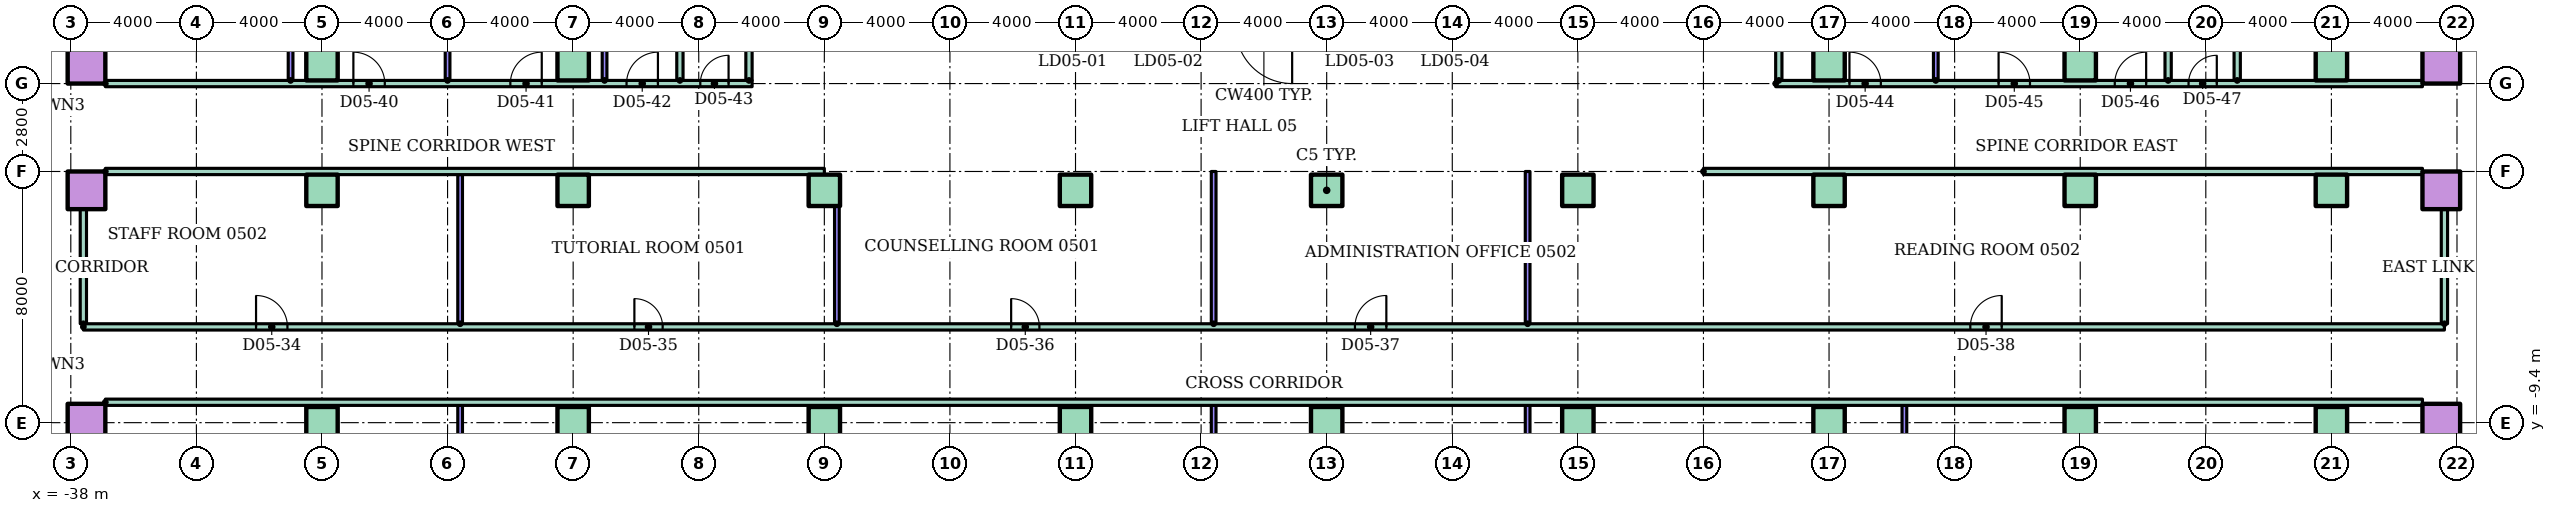
"""IFC4 building model, lengths in metres.
Left out: names, types, materials, properties, quantities, classifications, styles, units other than length and angle.
Written with IfcOpenShell. Run it as: python <this file> out.ifc"""

import sys

from ifc_helpers import new_model, si_unit, direction, frame, frame_2d, origin, origin_2d, place, context, subcontext, project, spatial, rectangle, hollow_rectangle, extrude, element, fill, save


model = new_model("IFC4")
c1 = context("Model", 3, precision=1e-05, world=origin(), true_north=direction((0.0, 1.0)))
c2 = subcontext(c1, "Body", "Model", "MODEL_VIEW")
j1 = project(units=[si_unit("LENGTHUNIT", "METRE"), si_unit("PLANEANGLEUNIT", "RADIAN")], contexts=[c1])
p1 = place(None, origin())
s1 = spatial("IfcSite", under=j1, at=p1, CompositionType="ELEMENT")
p2 = place(p1, origin())
s2 = spatial("IfcBuilding", under=s1, at=p2, CompositionType="ELEMENT")
p3 = place(p2, frame((0.0, 0.0, 22.0)))
s3 = spatial("IfcBuildingStorey", under=s2, at=p3, CompositionType="ELEMENT", Elevation=22.0)
p4 = place(p3, frame((-37.5, -9.4, 0.0)))
e1 = element("IfcColumn", 1, at=p4, inside=s3, PredefinedType="COLUMN", context=c2, shape_type="SweptSolid", body=[
    extrude(hollow_rectangle(XDim=1.2, YDim=1.2, WallThickness=0.06, at=origin_2d()), origin(), (0.0, 0.0, 1.0), 4.0),
])
for number, where in (
    (2, (-30.0, -9.4, 0.0)),
    (3, (-22.0, -9.4, 0.0)),
    (4, (-14.0, -9.4, 0.0)),
    (5, (-6.0, -9.4, 0.0)),
    (6, (2.0, -9.4, 0.0)),
    (7, (10.0, -9.4, 0.0)),
    (8, (18.0, -9.4, 0.0)),
    (9, (26.0, -9.4, 0.0)),
    (10, (34.0, -9.4, 0.0)),
):
    element("IfcColumn", number, at=place(p3, frame(where)), inside=s3, PredefinedType="COLUMN", context=c2, shape_type="SweptSolid", body=[
        extrude(rectangle(XDim=1.0, YDim=1.0, at=origin_2d()), origin(), (0.0, 0.0, 1.0), 4.0),
    ])
for number, where in (
    (11, (37.5, -9.4, 0.0)),
    (12, (-37.5, -2.0, 0.0)),
):
    element("IfcColumn", number, at=place(p3, frame(where)), inside=s3, PredefinedType="COLUMN", context=c2, shape_type="SweptSolid", body=[
        extrude(hollow_rectangle(XDim=1.2, YDim=1.2, WallThickness=0.06, at=origin_2d()), origin(), (0.0, 0.0, 1.0), 4.0),
    ])
for number, where in (
    (13, (-30.0, -2.0, 0.0)),
    (14, (-22.0, -2.0, 0.0)),
    (15, (-14.0, -2.0, 0.0)),
    (16, (-6.0, -2.0, 0.0)),
    (17, (2.0, -2.0, 0.0)),
    (18, (10.0, -2.0, 0.0)),
    (19, (18.0, -2.0, 0.0)),
    (20, (26.0, -2.0, 0.0)),
    (21, (34.0, -2.0, 0.0)),
):
    element("IfcColumn", number, at=place(p3, frame(where)), inside=s3, PredefinedType="COLUMN", context=c2, shape_type="SweptSolid", body=[
        extrude(rectangle(XDim=1.0, YDim=1.0, at=origin_2d()), origin(), (0.0, 0.0, 1.0), 4.0),
    ])
for number, where in (
    (22, (37.5, -2.0, 0.0)),
    (23, (-37.5, 2.0, 0.0)),
):
    element("IfcColumn", number, at=place(p3, frame(where)), inside=s3, PredefinedType="COLUMN", context=c2, shape_type="SweptSolid", body=[
        extrude(hollow_rectangle(XDim=1.2, YDim=1.2, WallThickness=0.06, at=origin_2d()), origin(), (0.0, 0.0, 1.0), 4.0),
    ])
for number, where in (
    (24, (-30.0, 2.0, 0.0)),
    (25, (-22.0, 2.0, 0.0)),
    (26, (18.0, 2.0, 0.0)),
    (27, (26.0, 2.0, 0.0)),
    (28, (34.0, 2.0, 0.0)),
):
    element("IfcColumn", number, at=place(p3, frame(where)), inside=s3, PredefinedType="COLUMN", context=c2, shape_type="SweptSolid", body=[
        extrude(rectangle(XDim=1.0, YDim=1.0, at=origin_2d()), origin(), (0.0, 0.0, 1.0), 4.0),
    ])
p5 = place(p3, frame((37.5, 2.0, 0.0)))
e29 = element("IfcColumn", 29, at=p5, inside=s3, PredefinedType="COLUMN", context=c2, shape_type="SweptSolid", body=[
    extrude(hollow_rectangle(XDim=1.2, YDim=1.2, WallThickness=0.06, at=origin_2d()), origin(), (0.0, 0.0, 1.0), 4.0),
])
p6 = place(p3, frame((-36.9, -8.75, 0.0)))
e30 = element("IfcWall", 30, at=p6, inside=s3, PredefinedType="PARTITIONING", context=c2, shape_type="SweptSolid", body=[
    extrude(rectangle(XDim=73.8, YDim=0.2, at=frame_2d((36.9, 0.0))), origin(), (0.0, 0.0, 1.0), 3.2),
])
p7 = place(p3, frame((-37.6, -6.35, 0.0)))
e31 = element("IfcWall", 31, at=p7, inside=s3, PredefinedType="PARTITIONING", context=c2, shape_type="SweptSolid", body=[
    extrude(rectangle(XDim=75.2, YDim=0.2, at=frame_2d((37.6, 0.0))), origin(), (0.0, 0.0, 1.0), 3.2),
])
p8 = place(p7, frame((5.5, 0.0, 0.0)))
e32 = element("IfcOpeningElement", 32, at=p8, cuts=e31, PredefinedType="OPENING", context=c2, shape_type="SweptSolid", body=[
    extrude(rectangle(XDim=1.0, YDim=2.1, at=frame_2d((0.5, 1.05))), frame((0.0, 0.11, 0.0), z_axis=(0.0, -1.0, 0.0), x_axis=(1.0, 0.0, 0.0)), (0.0, 0.0, 1.0), 0.22),
])
p9 = place(p7, frame((17.55, 0.0, 0.0)))
e33 = element("IfcOpeningElement", 33, at=p9, cuts=e31, PredefinedType="OPENING", context=c2, shape_type="SweptSolid", body=[
    extrude(rectangle(XDim=0.9, YDim=2.1, at=frame_2d((0.45, 1.05))), frame((0.0, 0.11, 0.0), z_axis=(0.0, -1.0, 0.0), x_axis=(1.0, 0.0, 0.0)), (0.0, 0.0, 1.0), 0.22),
])
p10 = place(p7, frame((29.55, 0.0, 0.0)))
e34 = element("IfcOpeningElement", 34, at=p10, cuts=e31, PredefinedType="OPENING", context=c2, shape_type="SweptSolid", body=[
    extrude(rectangle(XDim=0.9, YDim=2.1, at=frame_2d((0.45, 1.05))), frame((0.0, 0.11, 0.0), z_axis=(0.0, -1.0, 0.0), x_axis=(1.0, 0.0, 0.0)), (0.0, 0.0, 1.0), 0.22),
])
p11 = place(p7, frame((40.5, 0.0, 0.0)))
e35 = element("IfcOpeningElement", 35, at=p11, cuts=e31, PredefinedType="OPENING", context=c2, shape_type="SweptSolid", body=[
    extrude(rectangle(XDim=1.0, YDim=2.1, at=frame_2d((0.5, 1.05))), frame((0.0, 0.11, 0.0), z_axis=(0.0, -1.0, 0.0), x_axis=(1.0, 0.0, 0.0)), (0.0, 0.0, 1.0), 0.22),
])
p12 = place(p7, frame((60.1, 0.0, 0.0)))
e36 = element("IfcOpeningElement", 36, at=p12, cuts=e31, PredefinedType="OPENING", context=c2, shape_type="SweptSolid", body=[
    extrude(rectangle(XDim=1.0, YDim=2.1, at=frame_2d((0.5, 1.05))), frame((0.0, 0.11, 0.0), z_axis=(0.0, -1.0, 0.0), x_axis=(1.0, 0.0, 0.0)), (0.0, 0.0, 1.0), 0.22),
])
for number, where in (
    (37, (-36.9, -1.4, 0.0)),
    (38, (14.0, -1.4, 0.0)),
):
    element("IfcWall", number, at=place(p3, frame(where)), inside=s3, PredefinedType="PARTITIONING", context=c2, shape_type="SweptSolid", body=[
        extrude(rectangle(XDim=22.9, YDim=0.2, at=frame_2d((11.45, 0.0))), origin(), (0.0, 0.0, 1.0), 3.2),
    ])
p13 = place(p3, frame((-36.9, 1.4, 0.0)))
e39 = element("IfcWall", 39, at=p13, inside=s3, PredefinedType="PARTITIONING", context=c2, shape_type="SweptSolid", body=[
    extrude(rectangle(XDim=20.6, YDim=0.2, at=frame_2d((10.3, 0.0))), origin(), (0.0, 0.0, 1.0), 3.2),
])
p14 = place(p13, frame((7.9, 0.0, 0.0)))
e40 = element("IfcOpeningElement", 40, at=p14, cuts=e39, PredefinedType="OPENING", context=c2, shape_type="SweptSolid", body=[
    extrude(rectangle(XDim=1.0, YDim=2.1, at=frame_2d((0.5, 1.05))), frame((0.0, 0.11, 0.0), z_axis=(0.0, -1.0, 0.0), x_axis=(1.0, 0.0, 0.0)), (0.0, 0.0, 1.0), 0.22),
])
p15 = place(p13, frame((12.9, 0.0, 0.0)))
e41 = element("IfcOpeningElement", 41, at=p15, cuts=e39, PredefinedType="OPENING", context=c2, shape_type="SweptSolid", body=[
    extrude(rectangle(XDim=1.0, YDim=2.1, at=frame_2d((0.5, 1.05))), frame((0.0, 0.11, 0.0), z_axis=(0.0, -1.0, 0.0), x_axis=(1.0, 0.0, 0.0)), (0.0, 0.0, 1.0), 0.22),
])
p16 = place(p13, frame((16.6, 0.0, 0.0)))
e42 = element("IfcOpeningElement", 42, at=p16, cuts=e39, PredefinedType="OPENING", context=c2, shape_type="SweptSolid", body=[
    extrude(rectangle(XDim=1.0, YDim=2.1, at=frame_2d((0.5, 1.05))), frame((0.0, 0.11, 0.0), z_axis=(0.0, -1.0, 0.0), x_axis=(1.0, 0.0, 0.0)), (0.0, 0.0, 1.0), 0.22),
])
p17 = place(p13, frame((18.95, 0.0, 0.0)))
e43 = element("IfcOpeningElement", 43, at=p17, cuts=e39, PredefinedType="OPENING", context=c2, shape_type="SweptSolid", body=[
    extrude(rectangle(XDim=0.9, YDim=2.1, at=frame_2d((0.45, 1.05))), frame((0.0, 0.11, 0.0), z_axis=(0.0, -1.0, 0.0), x_axis=(1.0, 0.0, 0.0)), (0.0, 0.0, 1.0), 0.22),
])
p18 = place(p3, frame((16.3, 1.4, 0.0)))
e44 = element("IfcWall", 44, at=p18, inside=s3, PredefinedType="PARTITIONING", context=c2, shape_type="SweptSolid", body=[
    extrude(rectangle(XDim=20.6, YDim=0.2, at=frame_2d((10.3, 0.0))), origin(), (0.0, 0.0, 1.0), 3.2),
])
p19 = place(p18, frame((2.35, 0.0, 0.0)))
e45 = element("IfcOpeningElement", 45, at=p19, cuts=e44, PredefinedType="OPENING", context=c2, shape_type="SweptSolid", body=[
    extrude(rectangle(XDim=1.0, YDim=2.1, at=frame_2d((0.5, 1.05))), frame((0.0, 0.11, 0.0), z_axis=(0.0, -1.0, 0.0), x_axis=(1.0, 0.0, 0.0)), (0.0, 0.0, 1.0), 0.22),
])
p20 = place(p18, frame((7.1, 0.0, 0.0)))
e46 = element("IfcOpeningElement", 46, at=p20, cuts=e44, PredefinedType="OPENING", context=c2, shape_type="SweptSolid", body=[
    extrude(rectangle(XDim=1.0, YDim=2.1, at=frame_2d((0.5, 1.05))), frame((0.0, 0.11, 0.0), z_axis=(0.0, -1.0, 0.0), x_axis=(1.0, 0.0, 0.0)), (0.0, 0.0, 1.0), 0.22),
])
p21 = place(p18, frame((10.8, 0.0, 0.0)))
e47 = element("IfcOpeningElement", 47, at=p21, cuts=e44, PredefinedType="OPENING", context=c2, shape_type="SweptSolid", body=[
    extrude(rectangle(XDim=1.0, YDim=2.1, at=frame_2d((0.5, 1.05))), frame((0.0, 0.11, 0.0), z_axis=(0.0, -1.0, 0.0), x_axis=(1.0, 0.0, 0.0)), (0.0, 0.0, 1.0), 0.22),
])
p22 = place(p18, frame((13.15, 0.0, 0.0)))
e48 = element("IfcOpeningElement", 48, at=p22, cuts=e44, PredefinedType="OPENING", context=c2, shape_type="SweptSolid", body=[
    extrude(rectangle(XDim=0.9, YDim=2.1, at=frame_2d((0.45, 1.05))), frame((0.0, 0.11, 0.0), z_axis=(0.0, -1.0, 0.0), x_axis=(1.0, 0.0, 0.0)), (0.0, 0.0, 1.0), 0.22),
])
p23 = place(p3, frame((-37.6, -6.25, 0.0), z_axis=(0.0, 0.0, 1.0), x_axis=(0.0, 1.0, 0.0)))
e49 = element("IfcWall", 49, at=p23, inside=s3, PredefinedType="PARTITIONING", context=c2, shape_type="SweptSolid", body=[
    extrude(rectangle(XDim=3.65, YDim=0.2, at=frame_2d((1.825, 0.0))), origin(), (0.0, 0.0, 1.0), 3.2),
])
for number, where, z_axis, x_axis in (
    (50, (-31.0, 1.5, 0.0), (0.0, 0.0, 1.0), (0.0, 1.0, 0.0)),
    (51, (-26.0, 1.5, 0.0), (0.0, 0.0, 1.0), (0.0, 1.0, 0.0)),
):
    element("IfcWall", number, at=place(p3, frame(where, z_axis=z_axis, x_axis=x_axis)), inside=s3, PredefinedType="PARTITIONING", context=c2, shape_type="SweptSolid", body=[
        extrude(rectangle(XDim=7.0, YDim=0.15, at=frame_2d((3.5, 0.0))), origin(), (0.0, 0.0, 1.0), 3.2),
    ])
p24 = place(p3, frame((-25.6, -19.5, 0.0), z_axis=(0.0, 0.0, 1.0), x_axis=(0.0, 1.0, 0.0)))
e52 = element("IfcWall", 52, at=p24, inside=s3, PredefinedType="PARTITIONING", context=c2, shape_type="SweptSolid", body=[
    extrude(rectangle(XDim=10.65, YDim=0.15, at=frame_2d((5.325, 0.0))), origin(), (0.0, 0.0, 1.0), 3.2),
])
p25 = place(p3, frame((-25.6, -6.25, 0.0), z_axis=(0.0, 0.0, 1.0), x_axis=(0.0, 1.0, 0.0)))
e53 = element("IfcWall", 53, at=p25, inside=s3, PredefinedType="PARTITIONING", context=c2, shape_type="SweptSolid", body=[
    extrude(rectangle(XDim=4.75, YDim=0.15, at=frame_2d((2.375, 0.0))), origin(), (0.0, 0.0, 1.0), 3.2),
])
p26 = place(p3, frame((-21.0, 1.5, 0.0), z_axis=(0.0, 0.0, 1.0), x_axis=(0.0, 1.0, 0.0)))
e54 = element("IfcWall", 54, at=p26, inside=s3, PredefinedType="PARTITIONING", context=c2, shape_type="SweptSolid", body=[
    extrude(rectangle(XDim=7.0, YDim=0.15, at=frame_2d((3.5, 0.0))), origin(), (0.0, 0.0, 1.0), 3.2),
])
for number, where, z_axis, x_axis in (
    (55, (-18.6, 1.5, 0.0), (0.0, 0.0, 1.0), (0.0, 1.0, 0.0)),
    (56, (-16.4, 1.5, 0.0), (0.0, 0.0, 1.0), (0.0, 1.0, 0.0)),
):
    element("IfcWall", number, at=place(p3, frame(where, z_axis=z_axis, x_axis=x_axis)), inside=s3, PredefinedType="PARTITIONING", context=c2, shape_type="SweptSolid", body=[
        extrude(rectangle(XDim=7.0, YDim=0.2, at=frame_2d((3.5, 0.0))), origin(), (0.0, 0.0, 1.0), 3.2),
    ])
p27 = place(p3, frame((-13.6, -6.25, 0.0), z_axis=(0.0, 0.0, 1.0), x_axis=(0.0, 1.0, 0.0)))
e57 = element("IfcWall", 57, at=p27, inside=s3, PredefinedType="PARTITIONING", context=c2, shape_type="SweptSolid", body=[
    extrude(rectangle(XDim=3.75, YDim=0.15, at=frame_2d((1.875, 0.0))), origin(), (0.0, 0.0, 1.0), 3.2),
])
p28 = place(p3, frame((-1.6, -19.5, 0.0), z_axis=(0.0, 0.0, 1.0), x_axis=(0.0, 1.0, 0.0)))
e58 = element("IfcWall", 58, at=p28, inside=s3, PredefinedType="PARTITIONING", context=c2, shape_type="SweptSolid", body=[
    extrude(rectangle(XDim=10.65, YDim=0.15, at=frame_2d((5.325, 0.0))), origin(), (0.0, 0.0, 1.0), 3.2),
])
p29 = place(p3, frame((-1.6, -6.25, 0.0), z_axis=(0.0, 0.0, 1.0), x_axis=(0.0, 1.0, 0.0)))
e59 = element("IfcWall", 59, at=p29, inside=s3, PredefinedType="PARTITIONING", context=c2, shape_type="SweptSolid", body=[
    extrude(rectangle(XDim=4.85, YDim=0.15, at=frame_2d((2.425, 0.0))), origin(), (0.0, 0.0, 1.0), 3.2),
])
p30 = place(p3, frame((8.4, -19.5, 0.0), z_axis=(0.0, 0.0, 1.0), x_axis=(0.0, 1.0, 0.0)))
e60 = element("IfcWall", 60, at=p30, inside=s3, PredefinedType="PARTITIONING", context=c2, shape_type="SweptSolid", body=[
    extrude(rectangle(XDim=10.65, YDim=0.15, at=frame_2d((5.325, 0.0))), origin(), (0.0, 0.0, 1.0), 3.2),
])
p31 = place(p3, frame((8.4, -6.25, 0.0), z_axis=(0.0, 0.0, 1.0), x_axis=(0.0, 1.0, 0.0)))
e61 = element("IfcWall", 61, at=p31, inside=s3, PredefinedType="PARTITIONING", context=c2, shape_type="SweptSolid", body=[
    extrude(rectangle(XDim=4.85, YDim=0.15, at=frame_2d((2.425, 0.0))), origin(), (0.0, 0.0, 1.0), 3.2),
])
p32 = place(p3, frame((16.4, 1.5, 0.0), z_axis=(0.0, 0.0, 1.0), x_axis=(0.0, 1.0, 0.0)))
e62 = element("IfcWall", 62, at=p32, inside=s3, PredefinedType="PARTITIONING", context=c2, shape_type="SweptSolid", body=[
    extrude(rectangle(XDim=7.0, YDim=0.2, at=frame_2d((3.5, 0.0))), origin(), (0.0, 0.0, 1.0), 3.2),
])
p33 = place(p3, frame((20.4, -19.5, 0.0), z_axis=(0.0, 0.0, 1.0), x_axis=(0.0, 1.0, 0.0)))
e63 = element("IfcWall", 63, at=p33, inside=s3, PredefinedType="PARTITIONING", context=c2, shape_type="SweptSolid", body=[
    extrude(rectangle(XDim=10.65, YDim=0.15, at=frame_2d((5.325, 0.0))), origin(), (0.0, 0.0, 1.0), 3.2),
])
p34 = place(p3, frame((21.4, 1.5, 0.0), z_axis=(0.0, 0.0, 1.0), x_axis=(0.0, 1.0, 0.0)))
e64 = element("IfcWall", 64, at=p34, inside=s3, PredefinedType="PARTITIONING", context=c2, shape_type="SweptSolid", body=[
    extrude(rectangle(XDim=7.0, YDim=0.15, at=frame_2d((3.5, 0.0))), origin(), (0.0, 0.0, 1.0), 3.2),
])
for number, where, z_axis, x_axis in (
    (65, (28.8, 1.5, 0.0), (0.0, 0.0, 1.0), (0.0, 1.0, 0.0)),
    (66, (31.0, 1.5, 0.0), (0.0, 0.0, 1.0), (0.0, 1.0, 0.0)),
):
    element("IfcWall", number, at=place(p3, frame(where, z_axis=z_axis, x_axis=x_axis)), inside=s3, PredefinedType="PARTITIONING", context=c2, shape_type="SweptSolid", body=[
        extrude(rectangle(XDim=7.0, YDim=0.2, at=frame_2d((3.5, 0.0))), origin(), (0.0, 0.0, 1.0), 3.2),
    ])
p35 = place(p3, frame((37.6, -6.25, 0.0), z_axis=(0.0, 0.0, 1.0), x_axis=(0.0, 1.0, 0.0)))
e67 = element("IfcWall", 67, at=p35, inside=s3, PredefinedType="PARTITIONING", context=c2, shape_type="SweptSolid", body=[
    extrude(rectangle(XDim=3.65, YDim=0.2, at=frame_2d((1.825, 0.0))), origin(), (0.0, 0.0, 1.0), 3.2),
])
p36 = place(p8, origin())
e68 = element("IfcDoor", 68, at=p36, inside=s3, OperationType="SINGLE_SWING_LEFT", PredefinedType="DOOR", context=c2, shape_type="SweptSolid", body=[
    extrude(rectangle(XDim=1.0, YDim=2.1, at=frame_2d((0.5, 1.05))), frame((0.0, 0.025, 0.0), z_axis=(0.0, -1.0, 0.0), x_axis=(1.0, 0.0, 0.0)), (0.0, 0.0, 1.0), 0.05),
])
fill(e32, e68)
p37 = place(p9, origin())
e69 = element("IfcDoor", 69, at=p37, inside=s3, OperationType="SINGLE_SWING_LEFT", PredefinedType="DOOR", context=c2, shape_type="SweptSolid", body=[
    extrude(rectangle(XDim=0.9, YDim=2.1, at=frame_2d((0.45, 1.05))), frame((0.0, 0.025, 0.0), z_axis=(0.0, -1.0, 0.0), x_axis=(1.0, 0.0, 0.0)), (0.0, 0.0, 1.0), 0.05),
])
fill(e33, e69)
p38 = place(p10, origin())
e70 = element("IfcDoor", 70, at=p38, inside=s3, OperationType="SINGLE_SWING_LEFT", PredefinedType="DOOR", context=c2, shape_type="SweptSolid", body=[
    extrude(rectangle(XDim=0.9, YDim=2.1, at=frame_2d((0.45, 1.05))), frame((0.0, 0.025, 0.0), z_axis=(0.0, -1.0, 0.0), x_axis=(1.0, 0.0, 0.0)), (0.0, 0.0, 1.0), 0.05),
])
fill(e34, e70)
p39 = place(p11, origin())
e71 = element("IfcDoor", 71, at=p39, inside=s3, OperationType="SINGLE_SWING_RIGHT", PredefinedType="DOOR", context=c2, shape_type="SweptSolid", body=[
    extrude(rectangle(XDim=1.0, YDim=2.1, at=frame_2d((0.5, 1.05))), frame((0.0, 0.025, 0.0), z_axis=(0.0, -1.0, 0.0), x_axis=(1.0, 0.0, 0.0)), (0.0, 0.0, 1.0), 0.05),
])
fill(e35, e71)
p40 = place(p12, origin())
e72 = element("IfcDoor", 72, at=p40, inside=s3, OperationType="SINGLE_SWING_RIGHT", PredefinedType="DOOR", context=c2, shape_type="SweptSolid", body=[
    extrude(rectangle(XDim=1.0, YDim=2.1, at=frame_2d((0.5, 1.05))), frame((0.0, 0.025, 0.0), z_axis=(0.0, -1.0, 0.0), x_axis=(1.0, 0.0, 0.0)), (0.0, 0.0, 1.0), 0.05),
])
fill(e36, e72)
p41 = place(p14, origin())
e73 = element("IfcDoor", 73, at=p41, inside=s3, OperationType="SINGLE_SWING_LEFT", PredefinedType="DOOR", context=c2, shape_type="SweptSolid", body=[
    extrude(rectangle(XDim=1.0, YDim=2.1, at=frame_2d((0.5, 1.05))), frame((0.0, 0.025, 0.0), z_axis=(0.0, -1.0, 0.0), x_axis=(1.0, 0.0, 0.0)), (0.0, 0.0, 1.0), 0.05),
])
fill(e40, e73)
p42 = place(p15, origin())
e74 = element("IfcDoor", 74, at=p42, inside=s3, OperationType="SINGLE_SWING_RIGHT", PredefinedType="DOOR", context=c2, shape_type="SweptSolid", body=[
    extrude(rectangle(XDim=1.0, YDim=2.1, at=frame_2d((0.5, 1.05))), frame((0.0, 0.025, 0.0), z_axis=(0.0, -1.0, 0.0), x_axis=(1.0, 0.0, 0.0)), (0.0, 0.0, 1.0), 0.05),
])
fill(e41, e74)
p43 = place(p16, origin())
e75 = element("IfcDoor", 75, at=p43, inside=s3, OperationType="SINGLE_SWING_RIGHT", PredefinedType="DOOR", context=c2, shape_type="SweptSolid", body=[
    extrude(rectangle(XDim=1.0, YDim=2.1, at=frame_2d((0.5, 1.05))), frame((0.0, 0.025, 0.0), z_axis=(0.0, -1.0, 0.0), x_axis=(1.0, 0.0, 0.0)), (0.0, 0.0, 1.0), 0.05),
])
fill(e42, e75)
p44 = place(p17, origin())
e76 = element("IfcDoor", 76, at=p44, inside=s3, OperationType="SINGLE_SWING_RIGHT", PredefinedType="DOOR", context=c2, shape_type="SweptSolid", body=[
    extrude(rectangle(XDim=0.9, YDim=2.1, at=frame_2d((0.45, 1.05))), frame((0.0, 0.025, 0.0), z_axis=(0.0, -1.0, 0.0), x_axis=(1.0, 0.0, 0.0)), (0.0, 0.0, 1.0), 0.05),
])
fill(e43, e76)
p45 = place(p19, origin())
e77 = element("IfcDoor", 77, at=p45, inside=s3, OperationType="SINGLE_SWING_LEFT", PredefinedType="DOOR", context=c2, shape_type="SweptSolid", body=[
    extrude(rectangle(XDim=1.0, YDim=2.1, at=frame_2d((0.5, 1.05))), frame((0.0, 0.025, 0.0), z_axis=(0.0, -1.0, 0.0), x_axis=(1.0, 0.0, 0.0)), (0.0, 0.0, 1.0), 0.05),
])
fill(e45, e77)
p46 = place(p20, origin())
e78 = element("IfcDoor", 78, at=p46, inside=s3, OperationType="SINGLE_SWING_LEFT", PredefinedType="DOOR", context=c2, shape_type="SweptSolid", body=[
    extrude(rectangle(XDim=1.0, YDim=2.1, at=frame_2d((0.5, 1.05))), frame((0.0, 0.025, 0.0), z_axis=(0.0, -1.0, 0.0), x_axis=(1.0, 0.0, 0.0)), (0.0, 0.0, 1.0), 0.05),
])
fill(e46, e78)
p47 = place(p21, origin())
e79 = element("IfcDoor", 79, at=p47, inside=s3, OperationType="SINGLE_SWING_RIGHT", PredefinedType="DOOR", context=c2, shape_type="SweptSolid", body=[
    extrude(rectangle(XDim=1.0, YDim=2.1, at=frame_2d((0.5, 1.05))), frame((0.0, 0.025, 0.0), z_axis=(0.0, -1.0, 0.0), x_axis=(1.0, 0.0, 0.0)), (0.0, 0.0, 1.0), 0.05),
])
fill(e47, e79)
p48 = place(p22, origin())
e80 = element("IfcDoor", 80, at=p48, inside=s3, OperationType="SINGLE_SWING_RIGHT", PredefinedType="DOOR", context=c2, shape_type="SweptSolid", body=[
    extrude(rectangle(XDim=0.9, YDim=2.1, at=frame_2d((0.45, 1.05))), frame((0.0, 0.025, 0.0), z_axis=(0.0, -1.0, 0.0), x_axis=(1.0, 0.0, 0.0)), (0.0, 0.0, 1.0), 0.05),
])
fill(e48, e80)
save(model, sys.argv[1])
